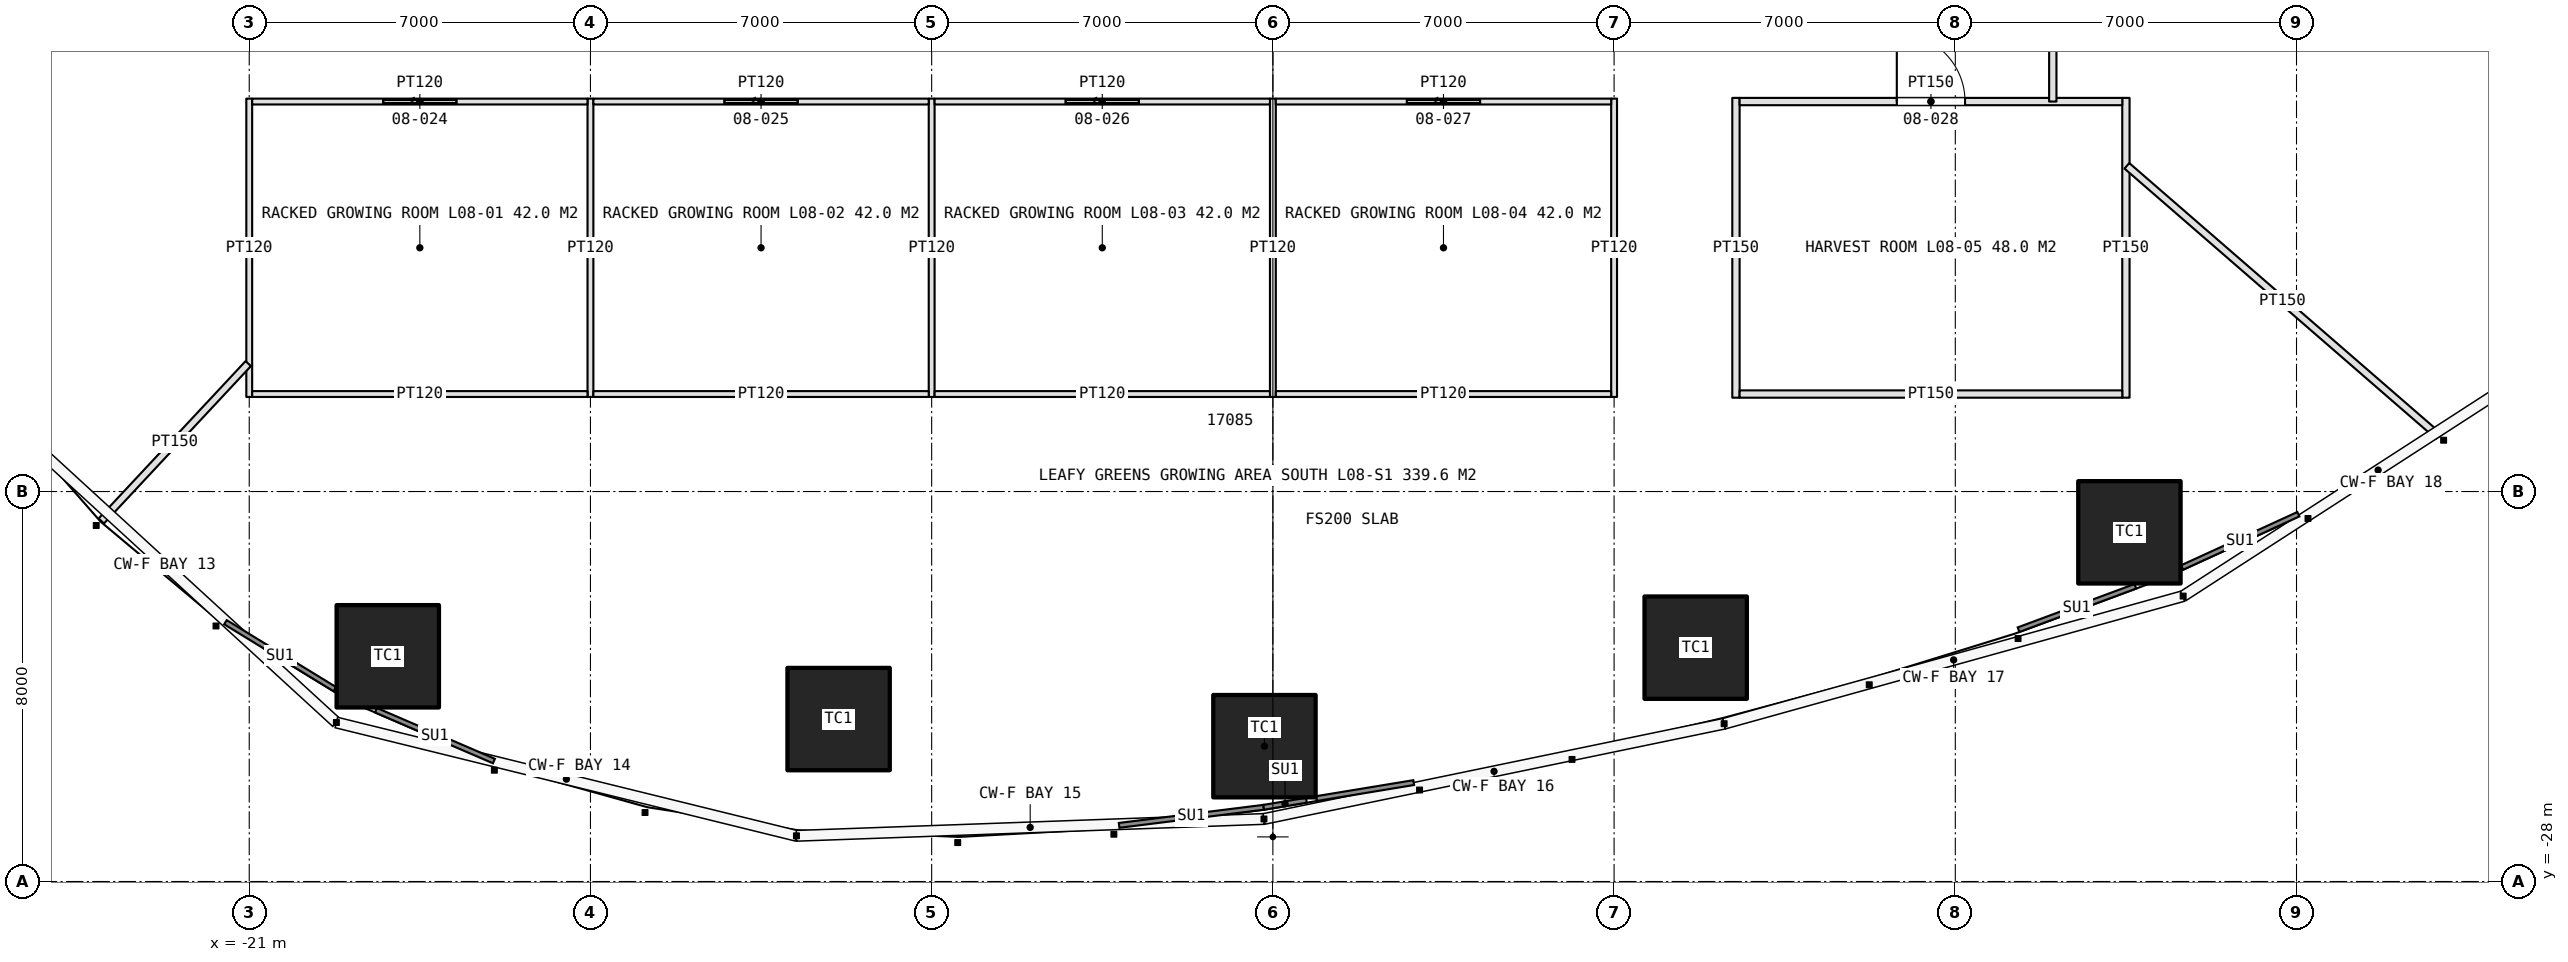
"""IFC4 building model, lengths in metres.
Left out: names, types, materials, properties, quantities, classifications, styles, units other than length and angle.
Written with IfcOpenShell. Run it as: python <this file> out.ifc"""

import sys

from ifc_helpers import new_model, si_unit, direction, frame, frame_2d, origin, origin_2d, place, context, subcontext, project, spatial, rectangle, extrude, element, fill, save


model = new_model("IFC4")
c1 = context("Model", 3, precision=1e-05, world=origin(), true_north=direction((0.0, 1.0)))
c2 = subcontext(c1, "Body", "Model", "MODEL_VIEW")
j1 = project(units=[si_unit("LENGTHUNIT", "METRE"), si_unit("PLANEANGLEUNIT", "RADIAN")], contexts=[c1])
p1 = place(None, origin())
s1 = spatial("IfcSite", under=j1, at=p1, CompositionType="ELEMENT")
p2 = place(p1, origin())
s2 = spatial("IfcBuilding", under=s1, at=p2, CompositionType="ELEMENT")
p3 = place(p2, frame((0.0, 0.0, 40.0)))
s3 = spatial("IfcBuildingStorey", under=s2, at=p3, CompositionType="ELEMENT", Elevation=40.0)
for number, where, z_axis, x_axis in (
    (1, (-18.158, -23.38, 0.0), (0.0, 0.0, 1.0), (1.0, 0.0, 0.0)),
    (2, (-8.909, -24.668, 0.0), (0.0, 0.0, 1.0), (1.0, 0.0, 0.0)),
    (3, (-0.173, -25.224, 0.0), (0.0, 0.0, 1.0), (1.0, 0.0, 0.0)),
    (4, (8.674, -23.203, 0.0), (0.0, 0.0, 1.0), (1.0, 0.0, 0.0)),
    (5, (17.572, -20.837, 0.0), (0.0, 0.0, 1.0), (1.0, 0.0, 0.0)),
):
    element("IfcColumn", number, at=place(p3, frame(where, z_axis=z_axis, x_axis=x_axis)), inside=s3, PredefinedType="COLUMN", context=c2, shape_type="SweptSolid", body=[
        extrude(rectangle(XDim=2.1, YDim=2.1, at=origin_2d()), origin(), (0.0, 0.0, 1.0), 5.0),
    ])
for number, where, z_axis, x_axis in (
    (6, (-21.0, -11.94, 0.0), (0.0, 0.0, 1.0), (0.0, -1.0, 0.0)),
    (7, (-14.0, -11.94, 0.0), (0.0, 0.0, 1.0), (0.0, -1.0, 0.0)),
    (8, (-7.0, -11.94, 0.0), (0.0, 0.0, 1.0), (0.0, -1.0, 0.0)),
    (9, (0.0, -11.94, 0.0), (0.0, 0.0, 1.0), (0.0, -1.0, 0.0)),
    (10, (7.0, -11.94, 0.0), (0.0, 0.0, 1.0), (0.0, -1.0, 0.0)),
):
    element("IfcWall", number, at=place(p3, frame(where, z_axis=z_axis, x_axis=x_axis)), inside=s3, PredefinedType="PARTITIONING", context=c2, shape_type="SweptSolid", body=[
        extrude(rectangle(XDim=6.12, YDim=0.12, at=frame_2d((3.06, 0.0))), origin(), (0.0, 0.0, 1.0), 3.6),
    ])
p4 = place(p3, frame((-20.94, -12.0, 0.0), z_axis=(0.0, 0.0, 1.0), x_axis=(1.0, 0.0, 0.0)))
e11 = element("IfcWall", 11, at=p4, inside=s3, PredefinedType="PARTITIONING", context=c2, shape_type="SweptSolid", body=[
    extrude(rectangle(XDim=6.88, YDim=0.12, at=frame_2d((3.44, 0.0))), origin(), (0.0, 0.0, 1.0), 3.6),
])
p5 = place(p4, frame((2.69, 0.0, 0.0)))
e12 = element("IfcOpeningElement", 12, at=p5, cuts=e11, PredefinedType="OPENING", context=c2, shape_type="SweptSolid", body=[
    extrude(rectangle(XDim=1.5, YDim=2.5, at=frame_2d((0.75, 1.25))), frame((0.0, 0.07, 0.0), z_axis=(0.0, -1.0, 0.0), x_axis=(1.0, 0.0, 0.0)), (0.0, 0.0, 1.0), 0.14),
])
p6 = place(p3, frame((-20.94, -18.0, 0.0), z_axis=(0.0, 0.0, 1.0), x_axis=(1.0, 0.0, 0.0)))
e13 = element("IfcWall", 13, at=p6, inside=s3, PredefinedType="PARTITIONING", context=c2, shape_type="SweptSolid", body=[
    extrude(rectangle(XDim=6.88, YDim=0.12, at=frame_2d((3.44, 0.0))), origin(), (0.0, 0.0, 1.0), 3.6),
])
p7 = place(p3, frame((-13.94, -12.0, 0.0), z_axis=(0.0, 0.0, 1.0), x_axis=(1.0, 0.0, 0.0)))
e14 = element("IfcWall", 14, at=p7, inside=s3, PredefinedType="PARTITIONING", context=c2, shape_type="SweptSolid", body=[
    extrude(rectangle(XDim=6.88, YDim=0.12, at=frame_2d((3.44, 0.0))), origin(), (0.0, 0.0, 1.0), 3.6),
])
p8 = place(p7, frame((2.69, 0.0, 0.0)))
e15 = element("IfcOpeningElement", 15, at=p8, cuts=e14, PredefinedType="OPENING", context=c2, shape_type="SweptSolid", body=[
    extrude(rectangle(XDim=1.5, YDim=2.5, at=frame_2d((0.75, 1.25))), frame((0.0, 0.07, 0.0), z_axis=(0.0, -1.0, 0.0), x_axis=(1.0, 0.0, 0.0)), (0.0, 0.0, 1.0), 0.14),
])
p9 = place(p3, frame((-13.94, -18.0, 0.0), z_axis=(0.0, 0.0, 1.0), x_axis=(1.0, 0.0, 0.0)))
e16 = element("IfcWall", 16, at=p9, inside=s3, PredefinedType="PARTITIONING", context=c2, shape_type="SweptSolid", body=[
    extrude(rectangle(XDim=6.88, YDim=0.12, at=frame_2d((3.44, 0.0))), origin(), (0.0, 0.0, 1.0), 3.6),
])
p10 = place(p3, frame((-6.94, -12.0, 0.0), z_axis=(0.0, 0.0, 1.0), x_axis=(1.0, 0.0, 0.0)))
e17 = element("IfcWall", 17, at=p10, inside=s3, PredefinedType="PARTITIONING", context=c2, shape_type="SweptSolid", body=[
    extrude(rectangle(XDim=6.88, YDim=0.12, at=frame_2d((3.44, 0.0))), origin(), (0.0, 0.0, 1.0), 3.6),
])
p11 = place(p10, frame((2.69, 0.0, 0.0)))
e18 = element("IfcOpeningElement", 18, at=p11, cuts=e17, PredefinedType="OPENING", context=c2, shape_type="SweptSolid", body=[
    extrude(rectangle(XDim=1.5, YDim=2.5, at=frame_2d((0.75, 1.25))), frame((0.0, 0.07, 0.0), z_axis=(0.0, -1.0, 0.0), x_axis=(1.0, 0.0, 0.0)), (0.0, 0.0, 1.0), 0.14),
])
p12 = place(p3, frame((-6.94, -18.0, 0.0), z_axis=(0.0, 0.0, 1.0), x_axis=(1.0, 0.0, 0.0)))
e19 = element("IfcWall", 19, at=p12, inside=s3, PredefinedType="PARTITIONING", context=c2, shape_type="SweptSolid", body=[
    extrude(rectangle(XDim=6.88, YDim=0.12, at=frame_2d((3.44, 0.0))), origin(), (0.0, 0.0, 1.0), 3.6),
])
p13 = place(p3, frame((0.06, -12.0, 0.0), z_axis=(0.0, 0.0, 1.0), x_axis=(1.0, 0.0, 0.0)))
e20 = element("IfcWall", 20, at=p13, inside=s3, PredefinedType="PARTITIONING", context=c2, shape_type="SweptSolid", body=[
    extrude(rectangle(XDim=6.88, YDim=0.12, at=frame_2d((3.44, 0.0))), origin(), (0.0, 0.0, 1.0), 3.6),
])
p14 = place(p13, frame((2.69, 0.0, 0.0)))
e21 = element("IfcOpeningElement", 21, at=p14, cuts=e20, PredefinedType="OPENING", context=c2, shape_type="SweptSolid", body=[
    extrude(rectangle(XDim=1.5, YDim=2.5, at=frame_2d((0.75, 1.25))), frame((0.0, 0.07, 0.0), z_axis=(0.0, -1.0, 0.0), x_axis=(1.0, 0.0, 0.0)), (0.0, 0.0, 1.0), 0.14),
])
p15 = place(p3, frame((0.06, -18.0, 0.0), z_axis=(0.0, 0.0, 1.0), x_axis=(1.0, 0.0, 0.0)))
e22 = element("IfcWall", 22, at=p15, inside=s3, PredefinedType="PARTITIONING", context=c2, shape_type="SweptSolid", body=[
    extrude(rectangle(XDim=6.88, YDim=0.12, at=frame_2d((3.44, 0.0))), origin(), (0.0, 0.0, 1.0), 3.6),
])
for number, where, z_axis, x_axis in (
    (23, (9.5, -11.925, 0.0), (0.0, 0.0, 1.0), (0.0, -1.0, 0.0)),
    (24, (17.5, -11.925, 0.0), (0.0, 0.0, 1.0), (0.0, -1.0, 0.0)),
):
    element("IfcWall", number, at=place(p3, frame(where, z_axis=z_axis, x_axis=x_axis)), inside=s3, PredefinedType="PARTITIONING", context=c2, shape_type="SweptSolid", body=[
        extrude(rectangle(XDim=6.15, YDim=0.15, at=frame_2d((3.075, 0.0))), origin(), (0.0, 0.0, 1.0), 3.6),
    ])
p16 = place(p3, frame((9.575, -12.0, 0.0), z_axis=(0.0, 0.0, 1.0), x_axis=(1.0, 0.0, 0.0)))
e25 = element("IfcWall", 25, at=p16, inside=s3, PredefinedType="PARTITIONING", context=c2, shape_type="SweptSolid", body=[
    extrude(rectangle(XDim=7.85, YDim=0.15, at=frame_2d((3.925, 0.0))), origin(), (0.0, 0.0, 1.0), 3.6),
])
p17 = place(p16, frame((3.225, 0.0, 0.0)))
e26 = element("IfcOpeningElement", 26, at=p17, cuts=e25, PredefinedType="OPENING", context=c2, shape_type="SweptSolid", body=[
    extrude(rectangle(XDim=1.4, YDim=2.4, at=frame_2d((0.7, 1.2))), frame((0.0, 0.085, 0.0), z_axis=(0.0, -1.0, 0.0), x_axis=(1.0, 0.0, 0.0)), (0.0, 0.0, 1.0), 0.17),
])
p18 = place(p3, frame((9.575, -18.0, 0.0), z_axis=(0.0, 0.0, 1.0), x_axis=(1.0, 0.0, 0.0)))
e27 = element("IfcWall", 27, at=p18, inside=s3, PredefinedType="PARTITIONING", context=c2, shape_type="SweptSolid", body=[
    extrude(rectangle(XDim=7.85, YDim=0.15, at=frame_2d((3.925, 0.0))), origin(), (0.0, 0.0, 1.0), 3.6),
])
p19 = place(p3, frame((-21.02, -17.375, 0.0), z_axis=(0.0, 0.0, 1.0), x_axis=(-0.682511222631, -0.730875113123, 0.0)))
e28 = element("IfcWall", 28, at=p19, inside=s3, PredefinedType="PARTITIONING", context=c2, shape_type="SweptSolid", body=[
    extrude(rectangle(XDim=4.417, YDim=0.15, at=frame_2d((2.208, 0.0))), origin(), (0.0, 0.0, 1.0), 3.6),
])
p20 = place(p3, frame((17.52, -13.318, 0.0), z_axis=(0.0, 0.0, 1.0), x_axis=(0.755434683868, -0.655223960497, 0.0)))
e29 = element("IfcWall", 29, at=p20, inside=s3, PredefinedType="PARTITIONING", context=c2, shape_type="SweptSolid", body=[
    extrude(rectangle(XDim=8.456, YDim=0.15, at=frame_2d((4.228, 0.0))), origin(), (0.0, 0.0, 1.0), 3.6),
])
p21 = place(p3, frame((16.0, -12.0, 0.0), z_axis=(0.0, 0.0, 1.0), x_axis=(0.0, 1.0, 0.0)))
e30 = element("IfcWall", 30, at=p21, inside=s3, PredefinedType="PARTITIONING", context=c2, shape_type="SweptSolid", body=[
    extrude(rectangle(XDim=3.0, YDim=0.15, at=frame_2d((1.5, 0.0))), origin(), (0.0, 0.0, 1.0), 3.6),
])
p22 = place(p5, origin())
e31 = element("IfcDoor", 31, at=p22, inside=s3, OperationType="SLIDING_TO_LEFT", PredefinedType="DOOR", context=c2, shape_type="SweptSolid", body=[
    extrude(rectangle(XDim=1.5, YDim=2.5, at=frame_2d((0.75, 1.25))), frame((0.0, 0.025, 0.0), z_axis=(0.0, -1.0, 0.0), x_axis=(1.0, 0.0, 0.0)), (0.0, 0.0, 1.0), 0.05),
])
fill(e12, e31)
p23 = place(p8, origin())
e32 = element("IfcDoor", 32, at=p23, inside=s3, OperationType="SLIDING_TO_LEFT", PredefinedType="DOOR", context=c2, shape_type="SweptSolid", body=[
    extrude(rectangle(XDim=1.5, YDim=2.5, at=frame_2d((0.75, 1.25))), frame((0.0, 0.025, 0.0), z_axis=(0.0, -1.0, 0.0), x_axis=(1.0, 0.0, 0.0)), (0.0, 0.0, 1.0), 0.05),
])
fill(e15, e32)
p24 = place(p11, origin())
e33 = element("IfcDoor", 33, at=p24, inside=s3, OperationType="SLIDING_TO_LEFT", PredefinedType="DOOR", context=c2, shape_type="SweptSolid", body=[
    extrude(rectangle(XDim=1.5, YDim=2.5, at=frame_2d((0.75, 1.25))), frame((0.0, 0.025, 0.0), z_axis=(0.0, -1.0, 0.0), x_axis=(1.0, 0.0, 0.0)), (0.0, 0.0, 1.0), 0.05),
])
fill(e18, e33)
p25 = place(p14, origin())
e34 = element("IfcDoor", 34, at=p25, inside=s3, OperationType="SLIDING_TO_LEFT", PredefinedType="DOOR", context=c2, shape_type="SweptSolid", body=[
    extrude(rectangle(XDim=1.5, YDim=2.5, at=frame_2d((0.75, 1.25))), frame((0.0, 0.025, 0.0), z_axis=(0.0, -1.0, 0.0), x_axis=(1.0, 0.0, 0.0)), (0.0, 0.0, 1.0), 0.05),
])
fill(e21, e34)
p26 = place(p17, origin())
e35 = element("IfcDoor", 35, at=p26, inside=s3, OperationType="DOUBLE_DOOR_DOUBLE_SWING", PredefinedType="DOOR", context=c2, shape_type="SweptSolid", body=[
    extrude(rectangle(XDim=1.4, YDim=2.4, at=frame_2d((0.7, 1.2))), frame((0.0, 0.025, 0.0), z_axis=(0.0, -1.0, 0.0), x_axis=(1.0, 0.0, 0.0)), (0.0, 0.0, 1.0), 0.05),
])
fill(e26, e35)
save(model, sys.argv[1])
